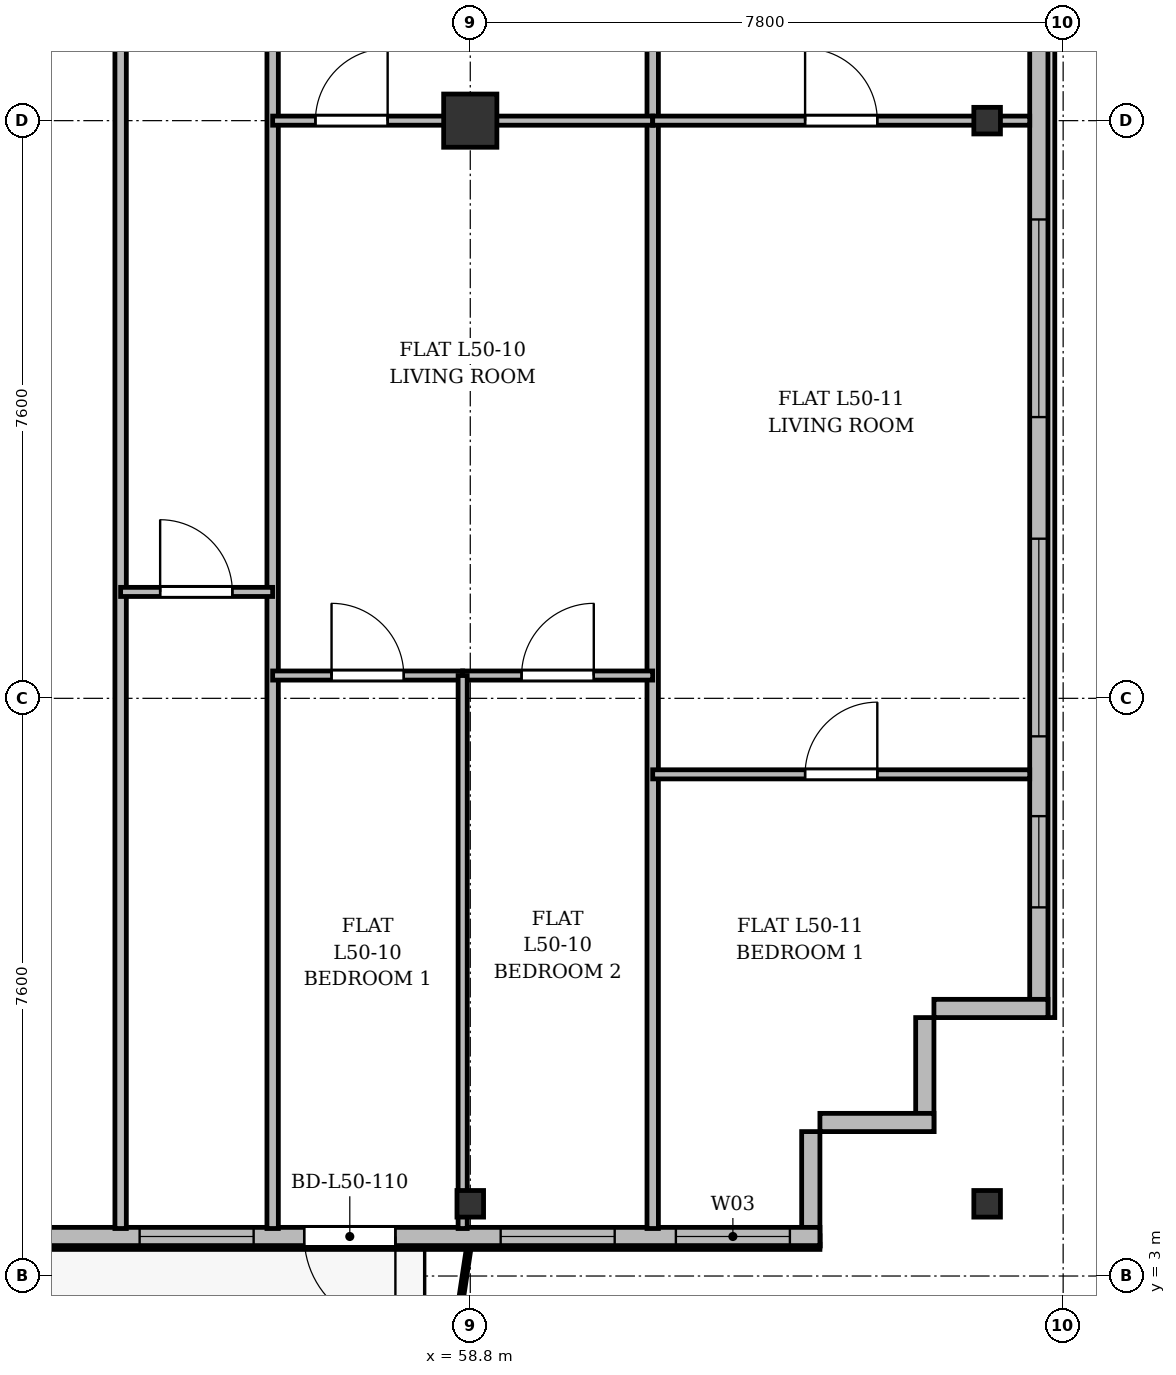
"""IFC4 building model, lengths in metres.
Left out: names, types, materials, properties, quantities, classifications, styles, units other than length and angle.
Written with IfcOpenShell. Run it as: python <this file> out.ifc"""

import sys

from ifc_helpers import new_model, si_unit, direction, frame, frame_2d, origin, origin_2d, place, context, subcontext, project, spatial, rectangle, i_section, extrude, source, transform, mapped, element, fill, save


model = new_model("IFC4")
c1 = context("Model", 3, precision=1e-05, world=origin(), true_north=direction((0.0, 1.0)))
c2 = subcontext(c1, "Body", "Model", "MODEL_VIEW")
j1 = project(units=[si_unit("LENGTHUNIT", "METRE"), si_unit("PLANEANGLEUNIT", "RADIAN")], contexts=[c1])
p1 = place(None, origin())
s1 = spatial("IfcSite", under=j1, at=p1, CompositionType="ELEMENT")
p2 = place(p1, origin())
s2 = spatial("IfcBuilding", under=s1, at=p2, CompositionType="ELEMENT")
p3 = place(p2, frame((0.0, 0.0, 194.1)))
s3 = spatial("IfcBuildingStorey", under=s2, at=p3, CompositionType="ELEMENT", Elevation=194.1)
m1 = source(origin(), c2, "Body", "SweptSolid", [
    extrude(i_section(OverallWidth=0.35, OverallDepth=0.35, WebThickness=0.018, FlangeThickness=0.028, at=origin_2d()), origin(), (0.0, 0.0, 1.0), 3.6),
])
p4 = place(p3, frame((58.8, 3.95, 0.0), z_axis=(0.0, 0.0, 1.0), x_axis=(1.0, 0.0, 0.0)))
e1 = element("IfcColumn", 1, at=p4, inside=s3, PredefinedType="COLUMN", context=c2, shape_type="MappedRepresentation", body=[
    mapped(m1, transform((0.0, 0.0, 0.0), x_axis=(1.0, 0.0, 0.0), y_axis=(0.0, 1.0, 0.0), z_axis=(0.0, 0.0, 1.0), scale=1.0)),
])
m2 = source(origin(), c2, "Body", "SweptSolid", [
    extrude(rectangle(XDim=0.7, YDim=0.7, at=origin_2d()), origin(), (0.0, 0.0, 1.0), 3.6),
])
p5 = place(p3, frame((58.8, 18.2, 0.0), z_axis=(0.0, 0.0, 1.0), x_axis=(1.0, 0.0, 0.0)))
e2 = element("IfcColumn", 2, at=p5, inside=s3, PredefinedType="COLUMN", context=c2, shape_type="MappedRepresentation", body=[
    mapped(m2, transform((0.0, 0.0, 0.0), x_axis=(1.0, 0.0, 0.0), y_axis=(0.0, 1.0, 0.0), z_axis=(0.0, 0.0, 1.0), scale=1.0)),
])
for number, where, z_axis, x_axis in (
    (3, (65.6, 3.95, 0.0), (0.0, 0.0, 1.0), (1.0, 0.0, 0.0)),
    (4, (65.6, 18.2, 0.0), (0.0, 0.0, 1.0), (1.0, 0.0, 0.0)),
):
    element("IfcColumn", number, at=place(p3, frame(where, z_axis=z_axis, x_axis=x_axis)), inside=s3, PredefinedType="COLUMN", context=c2, shape_type="MappedRepresentation", body=[
        mapped(m1, transform((0.0, 0.0, 0.0), x_axis=(1.0, 0.0, 0.0), y_axis=(0.0, 1.0, 0.0), z_axis=(0.0, 0.0, 1.0), scale=1.0)),
    ])
p6 = place(p3, frame((66.28, 45.5, 0.0), z_axis=(0.0, 0.0, 1.0), x_axis=(0.0, -1.0, 0.0)))
e5 = element("IfcWall", 5, at=p6, inside=s3, PredefinedType="SOLIDWALL", context=c2, shape_type="SweptSolid", body=[
    extrude(rectangle(XDim=39.1, YDim=0.24, at=frame_2d((19.55, 0.0))), origin(), (0.0, 0.0, 1.0), 3.36),
])
p7 = place(p6, frame((36.45, 0.0, 0.92)))
e6 = element("IfcOpeningElement", 6, at=p7, cuts=e5, PredefinedType="OPENING", context=c2, shape_type="SweptSolid", body=[
    extrude(rectangle(XDim=1.2, YDim=1.65, at=frame_2d((0.6, 0.825))), frame((0.0, 0.13, 0.0), z_axis=(0.0, -1.0, 0.0), x_axis=(1.0, 0.0, 0.0)), (0.0, 0.0, 1.0), 0.26),
])
p8 = place(p6, frame((32.8, 0.0, 0.92)))
e7 = element("IfcOpeningElement", 7, at=p8, cuts=e5, PredefinedType="OPENING", context=c2, shape_type="SweptSolid", body=[
    extrude(rectangle(XDim=2.6, YDim=1.9, at=frame_2d((1.3, 0.95))), frame((0.0, 0.13, 0.0), z_axis=(0.0, -1.0, 0.0), x_axis=(1.0, 0.0, 0.0)), (0.0, 0.0, 1.0), 0.26),
])
p9 = place(p6, frame((28.6, 0.0, 0.92)))
e8 = element("IfcOpeningElement", 8, at=p9, cuts=e5, PredefinedType="OPENING", context=c2, shape_type="SweptSolid", body=[
    extrude(rectangle(XDim=2.6, YDim=1.9, at=frame_2d((1.3, 0.95))), frame((0.0, 0.13, 0.0), z_axis=(0.0, -1.0, 0.0), x_axis=(1.0, 0.0, 0.0)), (0.0, 0.0, 1.0), 0.26),
])
p10 = place(p6, frame((21.4, 0.0, 0.92)))
e9 = element("IfcOpeningElement", 9, at=p10, cuts=e5, PredefinedType="OPENING", context=c2, shape_type="SweptSolid", body=[
    extrude(rectangle(XDim=2.6, YDim=1.9, at=frame_2d((1.3, 0.95))), frame((0.0, 0.13, 0.0), z_axis=(0.0, -1.0, 0.0), x_axis=(1.0, 0.0, 0.0)), (0.0, 0.0, 1.0), 0.26),
])
p11 = place(p6, frame((7.4, 0.0, 0.92)))
e10 = element("IfcOpeningElement", 10, at=p11, cuts=e5, PredefinedType="OPENING", context=c2, shape_type="SweptSolid", body=[
    extrude(rectangle(XDim=2.6, YDim=1.9, at=frame_2d((1.3, 0.95))), frame((0.0, 0.13, 0.0), z_axis=(0.0, -1.0, 0.0), x_axis=(1.0, 0.0, 0.0)), (0.0, 0.0, 1.0), 0.26),
])
p12 = place(p6, frame((4.5, 0.0, 0.92)))
e11 = element("IfcOpeningElement", 11, at=p12, cuts=e5, PredefinedType="OPENING", context=c2, shape_type="SweptSolid", body=[
    extrude(rectangle(XDim=1.2, YDim=1.65, at=frame_2d((0.6, 0.825))), frame((0.0, 0.13, 0.0), z_axis=(0.0, -1.0, 0.0), x_axis=(1.0, 0.0, 0.0)), (0.0, 0.0, 1.0), 0.26),
])
p13 = place(p6, frame((1.15, 0.0, 0.92)))
e12 = element("IfcOpeningElement", 12, at=p13, cuts=e5, PredefinedType="OPENING", context=c2, shape_type="SweptSolid", body=[
    extrude(rectangle(XDim=1.2, YDim=1.65, at=frame_2d((0.6, 0.825))), frame((0.0, 0.13, 0.0), z_axis=(0.0, -1.0, 0.0), x_axis=(1.0, 0.0, 0.0)), (0.0, 0.0, 1.0), 0.26),
])
p14 = place(p3, frame((66.4, 6.52, 0.0), z_axis=(0.0, 0.0, 1.0), x_axis=(-1.0, 0.0, 0.0)))
e13 = element("IfcWall", 13, at=p14, inside=s3, PredefinedType="SOLIDWALL", context=c2, shape_type="SweptSolid", body=[
    extrude(rectangle(XDim=1.5, YDim=0.24, at=frame_2d((0.75, 0.0))), origin(), (0.0, 0.0, 1.0), 2.86),
])
for number, where, z_axis, x_axis in (
    (14, (64.78, 6.4, 0.0), (0.0, 0.0, 1.0), (0.0, -1.0, 0.0)),
    (15, (64.9, 5.02, 0.0), (0.0, 0.0, 1.0), (-1.0, 0.0, 0.0)),
):
    element("IfcWall", number, at=place(p3, frame(where, z_axis=z_axis, x_axis=x_axis)), inside=s3, PredefinedType="SOLIDWALL", context=c2, shape_type="SweptSolid", body=[
        extrude(rectangle(XDim=1.5, YDim=0.24, at=frame_2d((0.75, 0.0))), origin(), (0.0, 0.0, 1.0), 3.36),
    ])
p15 = place(p3, frame((63.28, 4.9, 0.0), z_axis=(0.0, 0.0, 1.0), x_axis=(0.0, -1.0, 0.0)))
e16 = element("IfcWall", 16, at=p15, inside=s3, PredefinedType="SOLIDWALL", context=c2, shape_type="SweptSolid", body=[
    extrude(rectangle(XDim=1.5, YDim=0.24, at=frame_2d((0.75, 0.0))), origin(), (0.0, 0.0, 1.0), 2.91),
])
p16 = place(p3, frame((63.4, 3.52, 0.0), z_axis=(0.0, 0.0, 1.0), x_axis=(-1.0, 0.0, 0.0)))
e17 = element("IfcWall", 17, at=p16, inside=s3, PredefinedType="SOLIDWALL", context=c2, shape_type="SweptSolid", body=[
    extrude(rectangle(XDim=19.6, YDim=0.24, at=frame_2d((9.8, 0.0))), origin(), (0.0, 0.0, 1.0), 3.36),
])
p17 = place(p16, frame((0.395, 0.0, 0.9)))
e18 = element("IfcOpeningElement", 18, at=p17, cuts=e17, PredefinedType="OPENING", context=c2, shape_type="SweptSolid", body=[
    extrude(rectangle(XDim=1.5, YDim=1.75, at=frame_2d((0.75, 0.875))), frame((0.0, 0.13, 0.0), z_axis=(0.0, -1.0, 0.0), x_axis=(1.0, 0.0, 0.0)), (0.0, 0.0, 1.0), 0.26),
])
p18 = place(p16, frame((2.7, 0.0, 0.9)))
e19 = element("IfcOpeningElement", 19, at=p18, cuts=e17, PredefinedType="OPENING", context=c2, shape_type="SweptSolid", body=[
    extrude(rectangle(XDim=1.5, YDim=1.75, at=frame_2d((0.75, 0.875))), frame((0.0, 0.13, 0.0), z_axis=(0.0, -1.0, 0.0), x_axis=(1.0, 0.0, 0.0)), (0.0, 0.0, 1.0), 0.26),
])
p19 = place(p16, frame((5.585, 0.0, 0.0)))
e20 = element("IfcOpeningElement", 20, at=p19, cuts=e17, PredefinedType="OPENING", context=c2, shape_type="SweptSolid", body=[
    extrude(rectangle(XDim=1.2, YDim=2.2, at=frame_2d((0.6, 1.1))), frame((0.0, 0.13, 0.0), z_axis=(0.0, -1.0, 0.0), x_axis=(1.0, 0.0, 0.0)), (0.0, 0.0, 1.0), 0.26),
])
p20 = place(p16, frame((7.45, 0.0, 0.9)))
e21 = element("IfcOpeningElement", 21, at=p20, cuts=e17, PredefinedType="OPENING", context=c2, shape_type="SweptSolid", body=[
    extrude(rectangle(XDim=1.5, YDim=1.75, at=frame_2d((0.75, 0.875))), frame((0.0, 0.13, 0.0), z_axis=(0.0, -1.0, 0.0), x_axis=(1.0, 0.0, 0.0)), (0.0, 0.0, 1.0), 0.26),
])
p21 = place(p16, frame((10.875, 0.0, 0.9)))
e22 = element("IfcOpeningElement", 22, at=p21, cuts=e17, PredefinedType="OPENING", context=c2, shape_type="SweptSolid", body=[
    extrude(rectangle(XDim=1.65, YDim=1.85, at=frame_2d((0.825, 0.925))), frame((0.0, 0.13, 0.0), z_axis=(0.0, -1.0, 0.0), x_axis=(1.0, 0.0, 0.0)), (0.0, 0.0, 1.0), 0.26),
])
p22 = place(p16, frame((15.955, 0.0, 0.9)))
e23 = element("IfcOpeningElement", 23, at=p22, cuts=e17, PredefinedType="OPENING", context=c2, shape_type="SweptSolid", body=[
    extrude(rectangle(XDim=1.8, YDim=1.8, at=frame_2d((0.9, 0.9))), frame((0.0, 0.13, 0.0), z_axis=(0.0, -1.0, 0.0), x_axis=(1.0, 0.0, 0.0)), (0.0, 0.0, 1.0), 0.26),
])
for number, where, z_axis, x_axis in (
    (24, (61.2, 3.625, 0.0), (0.0, 0.0, 1.0), (0.0, 1.0, 0.0)),
    (25, (54.2, 3.625, 0.0), (0.0, 0.0, 1.0), (0.0, 1.0, 0.0)),
    (26, (56.2, 3.625, 0.0), (0.0, 0.0, 1.0), (0.0, 1.0, 0.0)),
):
    element("IfcWall", number, at=place(p3, frame(where, z_axis=z_axis, x_axis=x_axis)), inside=s3, PredefinedType="PARTITIONING", context=c2, shape_type="SweptSolid", body=[
        extrude(rectangle(XDim=27.175, YDim=0.15, at=frame_2d((13.587, 0.0))), origin(), (0.0, 0.0, 1.0), 2.91),
    ])
p23 = place(p3, frame((54.2, 12.0, 0.0), z_axis=(0.0, 0.0, 1.0), x_axis=(1.0, 0.0, 0.0)))
e27 = element("IfcWall", 27, at=p23, inside=s3, PredefinedType="PARTITIONING", context=c2, shape_type="SweptSolid", body=[
    extrude(rectangle(XDim=2.0, YDim=0.12, at=frame_2d((1.0, 0.0))), origin(), (0.0, 0.0, 1.0), 3.36),
])
p24 = place(p23, frame((0.52, 0.0, 0.0)))
e28 = element("IfcOpeningElement", 28, at=p24, cuts=e27, PredefinedType="OPENING", context=c2, shape_type="SweptSolid", body=[
    extrude(rectangle(XDim=0.95, YDim=2.15, at=frame_2d((0.475, 1.075))), frame((0.0, 0.07, 0.0), z_axis=(0.0, -1.0, 0.0), x_axis=(1.0, 0.0, 0.0)), (0.0, 0.0, 1.0), 0.14),
])
p25 = place(p3, frame((56.2, 18.2, 0.0), z_axis=(0.0, 0.0, 1.0), x_axis=(1.0, 0.0, 0.0)))
e29 = element("IfcWall", 29, at=p25, inside=s3, PredefinedType="PARTITIONING", context=c2, shape_type="SweptSolid", body=[
    extrude(rectangle(XDim=5.0, YDim=0.12, at=frame_2d((2.5, 0.0))), origin(), (0.0, 0.0, 1.0), 2.91),
])
p26 = place(p25, frame((0.563, 0.0, 0.0)))
e30 = element("IfcOpeningElement", 30, at=p26, cuts=e29, PredefinedType="OPENING", context=c2, shape_type="SweptSolid", body=[
    extrude(rectangle(XDim=0.95, YDim=2.15, at=frame_2d((0.475, 1.075))), frame((0.0, 0.07, 0.0), z_axis=(0.0, -1.0, 0.0), x_axis=(1.0, 0.0, 0.0)), (0.0, 0.0, 1.0), 0.14),
])
p27 = place(p3, frame((56.2, 10.9, 0.0), z_axis=(0.0, 0.0, 1.0), x_axis=(1.0, 0.0, 0.0)))
e31 = element("IfcWall", 31, at=p27, inside=s3, PredefinedType="PARTITIONING", context=c2, shape_type="SweptSolid", body=[
    extrude(rectangle(XDim=2.5, YDim=0.12, at=frame_2d((1.25, 0.0))), origin(), (0.0, 0.0, 1.0), 3.36),
])
p28 = place(p27, frame((0.775, 0.0, 0.0)))
e32 = element("IfcOpeningElement", 32, at=p28, cuts=e31, PredefinedType="OPENING", context=c2, shape_type="SweptSolid", body=[
    extrude(rectangle(XDim=0.95, YDim=2.15, at=frame_2d((0.475, 1.075))), frame((0.0, 0.07, 0.0), z_axis=(0.0, -1.0, 0.0), x_axis=(1.0, 0.0, 0.0)), (0.0, 0.0, 1.0), 0.14),
])
p29 = place(p3, frame((58.7, 10.9, 0.0), z_axis=(0.0, 0.0, 1.0), x_axis=(1.0, 0.0, 0.0)))
e33 = element("IfcWall", 33, at=p29, inside=s3, PredefinedType="PARTITIONING", context=c2, shape_type="SweptSolid", body=[
    extrude(rectangle(XDim=2.5, YDim=0.12, at=frame_2d((1.25, 0.0))), origin(), (0.0, 0.0, 1.0), 2.86),
])
p30 = place(p29, frame((0.775, 0.0, 0.0)))
e34 = element("IfcOpeningElement", 34, at=p30, cuts=e33, PredefinedType="OPENING", context=c2, shape_type="SweptSolid", body=[
    extrude(rectangle(XDim=0.95, YDim=2.15, at=frame_2d((0.475, 1.075))), frame((0.0, 0.07, 0.0), z_axis=(0.0, -1.0, 0.0), x_axis=(1.0, 0.0, 0.0)), (0.0, 0.0, 1.0), 0.14),
])
p31 = place(p3, frame((58.7, 3.625, 0.0), z_axis=(0.0, 0.0, 1.0), x_axis=(0.0, 1.0, 0.0)))
e35 = element("IfcWall", 35, at=p31, inside=s3, PredefinedType="PARTITIONING", context=c2, shape_type="SweptSolid", body=[
    extrude(rectangle(XDim=7.275, YDim=0.12, at=frame_2d((3.637, 0.0))), origin(), (0.0, 0.0, 1.0), 2.86),
])
p32 = place(p3, frame((61.2, 18.2, 0.0), z_axis=(0.0, 0.0, 1.0), x_axis=(1.0, 0.0, 0.0)))
e36 = element("IfcWall", 36, at=p32, inside=s3, PredefinedType="PARTITIONING", context=c2, shape_type="SweptSolid", body=[
    extrude(rectangle(XDim=4.96, YDim=0.12, at=frame_2d((2.48, 0.0))), origin(), (0.0, 0.0, 1.0), 2.91),
])
p33 = place(p32, frame((2.005, 0.0, 0.0)))
e37 = element("IfcOpeningElement", 37, at=p33, cuts=e36, PredefinedType="OPENING", context=c2, shape_type="SweptSolid", body=[
    extrude(rectangle(XDim=0.95, YDim=2.15, at=frame_2d((0.475, 1.075))), frame((0.0, 0.07, 0.0), z_axis=(0.0, -1.0, 0.0), x_axis=(1.0, 0.0, 0.0)), (0.0, 0.0, 1.0), 0.14),
])
p34 = place(p3, frame((61.2, 9.6, 0.0), z_axis=(0.0, 0.0, 1.0), x_axis=(1.0, 0.0, 0.0)))
e38 = element("IfcWall", 38, at=p34, inside=s3, PredefinedType="PARTITIONING", context=c2, shape_type="SweptSolid", body=[
    extrude(rectangle(XDim=4.96, YDim=0.12, at=frame_2d((2.48, 0.0))), origin(), (0.0, 0.0, 1.0), 2.86),
])
p35 = place(p34, frame((2.005, 0.0, 0.0)))
e39 = element("IfcOpeningElement", 39, at=p35, cuts=e38, PredefinedType="OPENING", context=c2, shape_type="SweptSolid", body=[
    extrude(rectangle(XDim=0.95, YDim=2.15, at=frame_2d((0.475, 1.075))), frame((0.0, 0.07, 0.0), z_axis=(0.0, -1.0, 0.0), x_axis=(1.0, 0.0, 0.0)), (0.0, 0.0, 1.0), 0.14),
])
m3 = source(origin(), c2, "Body", "SweptSolid", [
    extrude(rectangle(XDim=1.2, YDim=1.65, at=frame_2d((0.6, 0.825))), frame((0.0, 0.03, 0.0), z_axis=(0.0, -1.0, 0.0), x_axis=(1.0, 0.0, 0.0)), (0.0, 0.0, 1.0), 0.06),
])
p36 = place(p7, origin())
e40 = element("IfcWindow", 40, at=p36, inside=s3, PartitioningType="SINGLE_PANEL", PredefinedType="WINDOW", context=c2, shape_type="MappedRepresentation", body=[
    mapped(m3, transform((0.0, 0.0, 0.0), x_axis=(1.0, 0.0, 0.0), y_axis=(0.0, 1.0, 0.0), z_axis=(0.0, 0.0, 1.0), scale=1.0)),
])
fill(e6, e40)
m4 = source(origin(), c2, "Body", "SweptSolid", [
    extrude(rectangle(XDim=2.6, YDim=1.9, at=frame_2d((1.3, 0.95))), frame((0.0, 0.03, 0.0), z_axis=(0.0, -1.0, 0.0), x_axis=(1.0, 0.0, 0.0)), (0.0, 0.0, 1.0), 0.06),
])
p37 = place(p8, origin())
e41 = element("IfcWindow", 41, at=p37, inside=s3, PartitioningType="SINGLE_PANEL", PredefinedType="WINDOW", context=c2, shape_type="MappedRepresentation", body=[
    mapped(m4, transform((0.0, 0.0, 0.0), x_axis=(1.0, 0.0, 0.0), y_axis=(0.0, 1.0, 0.0), z_axis=(0.0, 0.0, 1.0), scale=1.0)),
])
fill(e7, e41)
p38 = place(p9, origin())
e42 = element("IfcWindow", 42, at=p38, inside=s3, PartitioningType="SINGLE_PANEL", PredefinedType="WINDOW", context=c2, shape_type="MappedRepresentation", body=[
    mapped(m4, transform((0.0, 0.0, 0.0), x_axis=(1.0, 0.0, 0.0), y_axis=(0.0, 1.0, 0.0), z_axis=(0.0, 0.0, 1.0), scale=1.0)),
])
fill(e8, e42)
m5 = source(origin(), c2, "Body", "SweptSolid", [
    extrude(rectangle(XDim=1.5, YDim=1.75, at=frame_2d((0.75, 0.875))), frame((0.0, 0.03, 0.0), z_axis=(0.0, -1.0, 0.0), x_axis=(1.0, 0.0, 0.0)), (0.0, 0.0, 1.0), 0.06),
])
p39 = place(p17, origin())
e43 = element("IfcWindow", 43, at=p39, inside=s3, PartitioningType="SINGLE_PANEL", PredefinedType="WINDOW", context=c2, shape_type="MappedRepresentation", body=[
    mapped(m5, transform((0.0, 0.0, 0.0), x_axis=(1.0, 0.0, 0.0), y_axis=(0.0, 1.0, 0.0), z_axis=(0.0, 0.0, 1.0), scale=1.0)),
])
fill(e18, e43)
p40 = place(p18, origin())
e44 = element("IfcWindow", 44, at=p40, inside=s3, PartitioningType="SINGLE_PANEL", PredefinedType="WINDOW", context=c2, shape_type="MappedRepresentation", body=[
    mapped(m5, transform((0.0, 0.0, 0.0), x_axis=(1.0, 0.0, 0.0), y_axis=(0.0, 1.0, 0.0), z_axis=(0.0, 0.0, 1.0), scale=1.0)),
])
fill(e19, e44)
m6 = source(origin(), c2, "Body", "SweptSolid", [
    extrude(rectangle(XDim=1.2, YDim=2.2, at=frame_2d((0.6, 1.1))), frame((0.0, 0.025, 0.0), z_axis=(0.0, -1.0, 0.0), x_axis=(1.0, 0.0, 0.0)), (0.0, 0.0, 1.0), 0.05),
])
p41 = place(p19, origin())
e45 = element("IfcDoor", 45, at=p41, inside=s3, OperationType="SINGLE_SWING_LEFT", PredefinedType="DOOR", context=c2, shape_type="MappedRepresentation", body=[
    mapped(m6, transform((0.0, 0.0, 0.0), x_axis=(1.0, 0.0, 0.0), y_axis=(0.0, 1.0, 0.0), z_axis=(0.0, 0.0, 1.0), scale=1.0)),
])
fill(e20, e45)
p42 = place(p20, origin())
e46 = element("IfcWindow", 46, at=p42, inside=s3, PartitioningType="SINGLE_PANEL", PredefinedType="WINDOW", context=c2, shape_type="MappedRepresentation", body=[
    mapped(m5, transform((0.0, 0.0, 0.0), x_axis=(1.0, 0.0, 0.0), y_axis=(0.0, 1.0, 0.0), z_axis=(0.0, 0.0, 1.0), scale=1.0)),
])
fill(e21, e46)
m7 = source(origin(), c2, "Body", "SweptSolid", [
    extrude(rectangle(XDim=0.95, YDim=2.15, at=frame_2d((0.475, 1.075))), frame((0.0, 0.025, 0.0), z_axis=(0.0, -1.0, 0.0), x_axis=(1.0, 0.0, 0.0)), (0.0, 0.0, 1.0), 0.05),
])
p43 = place(p24, origin())
e47 = element("IfcDoor", 47, at=p43, inside=s3, OperationType="SINGLE_SWING_LEFT", PredefinedType="DOOR", context=c2, shape_type="MappedRepresentation", body=[
    mapped(m7, transform((0.0, 0.0, 0.0), x_axis=(1.0, 0.0, 0.0), y_axis=(0.0, 1.0, 0.0), z_axis=(0.0, 0.0, 1.0), scale=1.0)),
])
fill(e28, e47)
p44 = place(p26, origin())
e48 = element("IfcDoor", 48, at=p44, inside=s3, OperationType="SINGLE_SWING_RIGHT", PredefinedType="DOOR", context=c2, shape_type="MappedRepresentation", body=[
    mapped(m7, transform((0.0, 0.0, 0.0), x_axis=(1.0, 0.0, 0.0), y_axis=(0.0, 1.0, 0.0), z_axis=(0.0, 0.0, 1.0), scale=1.0)),
])
fill(e30, e48)
p45 = place(p28, origin())
e49 = element("IfcDoor", 49, at=p45, inside=s3, OperationType="SINGLE_SWING_LEFT", PredefinedType="DOOR", context=c2, shape_type="MappedRepresentation", body=[
    mapped(m7, transform((0.0, 0.0, 0.0), x_axis=(1.0, 0.0, 0.0), y_axis=(0.0, 1.0, 0.0), z_axis=(0.0, 0.0, 1.0), scale=1.0)),
])
fill(e32, e49)
p46 = place(p30, origin())
e50 = element("IfcDoor", 50, at=p46, inside=s3, OperationType="SINGLE_SWING_RIGHT", PredefinedType="DOOR", context=c2, shape_type="MappedRepresentation", body=[
    mapped(m7, transform((0.0, 0.0, 0.0), x_axis=(1.0, 0.0, 0.0), y_axis=(0.0, 1.0, 0.0), z_axis=(0.0, 0.0, 1.0), scale=1.0)),
])
fill(e34, e50)
p47 = place(p33, origin())
e51 = element("IfcDoor", 51, at=p47, inside=s3, OperationType="SINGLE_SWING_LEFT", PredefinedType="DOOR", context=c2, shape_type="MappedRepresentation", body=[
    mapped(m7, transform((0.0, 0.0, 0.0), x_axis=(1.0, 0.0, 0.0), y_axis=(0.0, 1.0, 0.0), z_axis=(0.0, 0.0, 1.0), scale=1.0)),
])
fill(e37, e51)
p48 = place(p35, origin())
e52 = element("IfcDoor", 52, at=p48, inside=s3, OperationType="SINGLE_SWING_RIGHT", PredefinedType="DOOR", context=c2, shape_type="MappedRepresentation", body=[
    mapped(m7, transform((0.0, 0.0, 0.0), x_axis=(1.0, 0.0, 0.0), y_axis=(0.0, 1.0, 0.0), z_axis=(0.0, 0.0, 1.0), scale=1.0)),
])
fill(e39, e52)
save(model, sys.argv[1])
